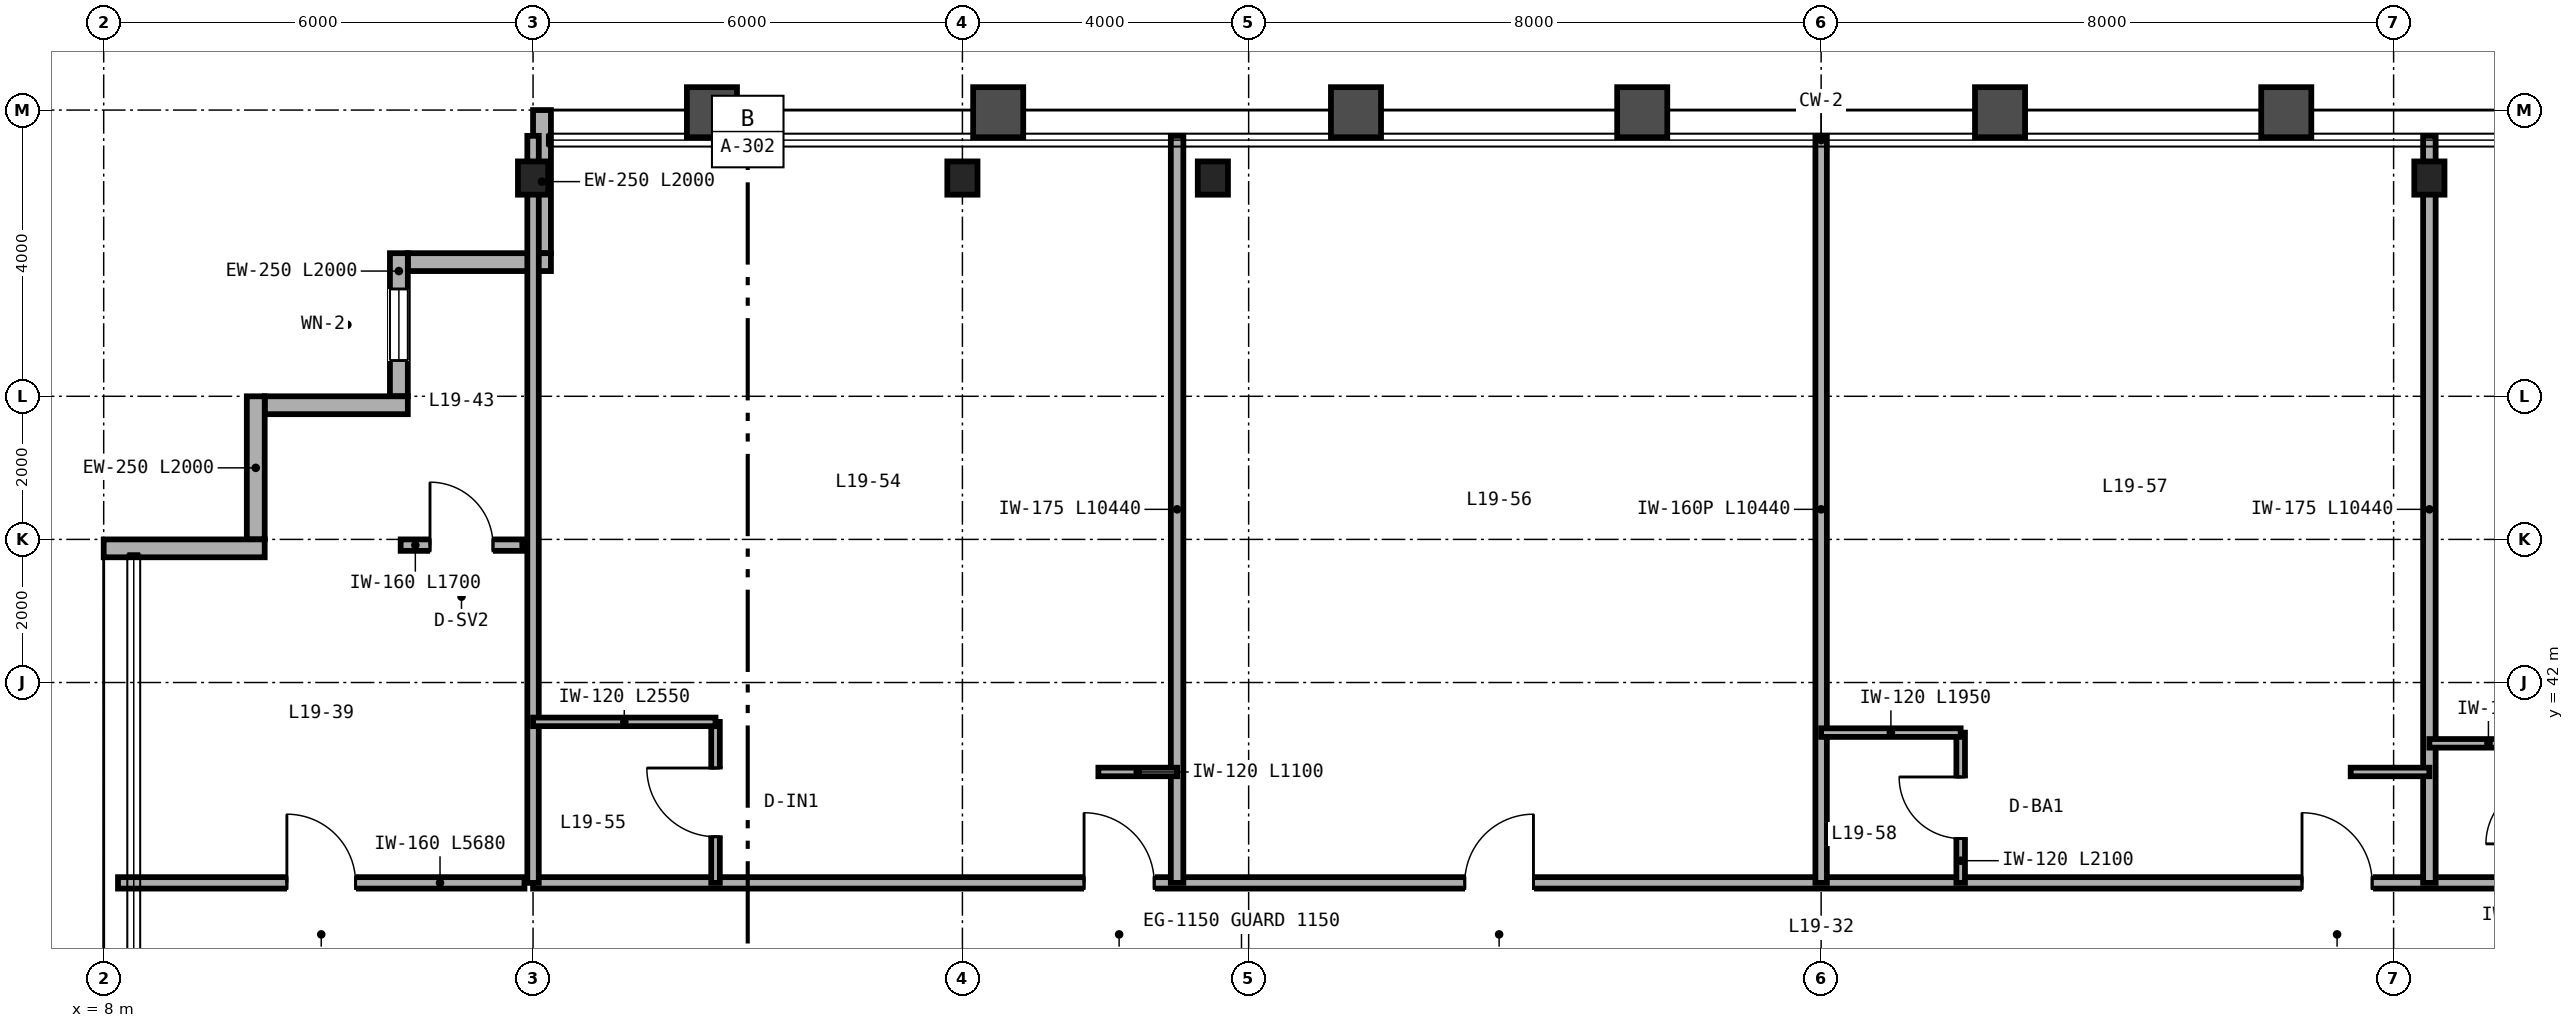
"""IFC4 building model, lengths in metres.
Left out: names, types, materials, properties, quantities, classifications, styles, units other than length and angle.
Written with IfcOpenShell. Run it as: python <this file> out.ifc"""

import sys

from ifc_helpers import new_model, si_unit, direction, frame, frame_2d, origin, origin_2d, place, context, subcontext, project, spatial, rectangle, i_section, extrude, source, transform, mapped, element, fill, save


model = new_model("IFC4")
c1 = context("Model", 3, precision=1e-05, world=origin(), true_north=direction((0.0, 1.0)))
c2 = subcontext(c1, "Body", "Model", "MODEL_VIEW")
j1 = project(units=[si_unit("LENGTHUNIT", "METRE"), si_unit("PLANEANGLEUNIT", "RADIAN")], contexts=[c1])
p1 = place(None, origin())
s1 = spatial("IfcSite", under=j1, at=p1, CompositionType="ELEMENT")
p2 = place(p1, origin())
s2 = spatial("IfcBuilding", under=s1, at=p2, CompositionType="ELEMENT")
p3 = place(p2, frame((0.0, 0.0, 78.0)))
s3 = spatial("IfcBuildingStorey", under=s2, at=p3, CompositionType="ELEMENT", Elevation=78.0)
m1 = source(origin(), c2, "Body", "SweptSolid", [
    extrude(i_section(OverallWidth=0.422, OverallDepth=0.465, WebThickness=0.045, FlangeThickness=0.073, FilletRadius=0.025, at=origin_2d()), origin(), (0.0, 0.0, 1.0), 3.35),
])
for number, where, z_axis, x_axis in (
    (1, (14.0, 49.05, 0.0), (0.0, 0.0, 1.0), (1.0, 0.0, 0.0)),
    (2, (20.0, 49.05, 0.0), (0.0, 0.0, 1.0), (1.0, 0.0, 0.0)),
    (3, (23.5, 49.05, 0.0), (0.0, 0.0, 1.0), (1.0, 0.0, 0.0)),
    (4, (40.5, 49.05, 0.0), (0.0, 0.0, 1.0), (1.0, 0.0, 0.0)),
):
    element("IfcColumn", number, at=place(p3, frame(where, z_axis=z_axis, x_axis=x_axis)), inside=s3, PredefinedType="COLUMN", context=c2, shape_type="MappedRepresentation", body=[
        mapped(m1, transform((0.0, 0.0, 0.0), scale=1.0)),
    ])
p4 = place(p3, frame((14.125, 50.0, 0.0), z_axis=(0.0, 0.0, 1.0), x_axis=(0.0, -1.0, 0.0)))
e5 = element("IfcWall", 5, at=p4, inside=s3, PredefinedType="SOLIDWALL", context=c2, shape_type="SweptSolid", body=[
    extrude(rectangle(XDim=2.0, YDim=0.25, at=frame_2d((1.0, 0.0))), origin(), (0.0, 0.0, 1.0), 2.657),
])
p5 = place(p3, frame((14.25, 47.875, 0.0), z_axis=(0.0, 0.0, 1.0), x_axis=(-1.0, 0.0, 0.0)))
e6 = element("IfcWall", 6, at=p5, inside=s3, PredefinedType="SOLIDWALL", context=c2, shape_type="SweptSolid", body=[
    extrude(rectangle(XDim=2.0, YDim=0.25, at=frame_2d((1.0, 0.0))), origin(), (0.0, 0.0, 1.0), 3.35),
])
p6 = place(p3, frame((12.125, 48.0, 0.0), z_axis=(0.0, 0.0, 1.0), x_axis=(0.0, -1.0, 0.0)))
e7 = element("IfcWall", 7, at=p6, inside=s3, PredefinedType="SOLIDWALL", context=c2, shape_type="SweptSolid", body=[
    extrude(rectangle(XDim=2.0, YDim=0.25, at=frame_2d((1.0, 0.0))), origin(), (0.0, 0.0, 1.0), 3.35),
])
p7 = place(p6, frame((0.5, 0.0, 0.85)))
e8 = element("IfcOpeningElement", 8, at=p7, cuts=e7, PredefinedType="OPENING", context=c2, shape_type="SweptSolid", body=[
    extrude(rectangle(XDim=1.0, YDim=1.9, at=frame_2d((0.5, 0.95))), frame((0.0, 0.135, 0.0), z_axis=(0.0, -1.0, 0.0), x_axis=(1.0, 0.0, 0.0)), (0.0, 0.0, 1.0), 0.27),
])
for number, where, z_axis, x_axis in (
    (9, (12.25, 45.875, 0.0), (0.0, 0.0, 1.0), (-1.0, 0.0, 0.0)),
    (10, (10.125, 46.0, 0.0), (0.0, 0.0, 1.0), (0.0, -1.0, 0.0)),
):
    element("IfcWall", number, at=place(p3, frame(where, z_axis=z_axis, x_axis=x_axis)), inside=s3, PredefinedType="SOLIDWALL", context=c2, shape_type="SweptSolid", body=[
        extrude(rectangle(XDim=2.0, YDim=0.25, at=frame_2d((1.0, 0.0))), origin(), (0.0, 0.0, 1.0), 3.35),
    ])
p8 = place(p3, frame((10.25, 43.875, 0.0), z_axis=(0.0, 0.0, 1.0), x_axis=(-1.0, 0.0, 0.0)))
e11 = element("IfcWall", 11, at=p8, inside=s3, PredefinedType="SOLIDWALL", context=c2, shape_type="SweptSolid", body=[
    extrude(rectangle(XDim=2.25, YDim=0.25, at=frame_2d((1.125, 0.0))), origin(), (0.0, 0.0, 1.0), 3.35),
])
p9 = place(p3, frame((8.2, 39.2, 0.0), z_axis=(0.0, 0.0, 1.0), x_axis=(1.0, 0.0, 0.0)))
e12 = element("IfcWall", 12, at=p9, inside=s3, PredefinedType="PARTITIONING", context=c2, shape_type="SweptSolid", body=[
    extrude(rectangle(XDim=5.68, YDim=0.16, at=frame_2d((2.84, 0.0))), origin(), (0.0, 0.0, 1.0), 3.35),
])
p10 = place(p9, frame((2.36, 0.0, 0.0)))
e13 = element("IfcOpeningElement", 13, at=p10, cuts=e12, PredefinedType="OPENING", context=c2, shape_type="SweptSolid", body=[
    extrude(rectangle(XDim=0.96, YDim=2.15, at=frame_2d((0.48, 1.075))), frame((0.0, 0.09, 0.0), z_axis=(0.0, -1.0, 0.0), x_axis=(1.0, 0.0, 0.0)), (0.0, 0.0, 1.0), 0.18),
])
p11 = place(p3, frame((12.15, 43.92, 0.0), z_axis=(0.0, 0.0, 1.0), x_axis=(1.0, 0.0, 0.0)))
e14 = element("IfcWall", 14, at=p11, inside=s3, PredefinedType="PARTITIONING", context=c2, shape_type="SweptSolid", body=[
    extrude(rectangle(XDim=1.7, YDim=0.16, at=frame_2d((0.85, 0.0))), origin(), (0.0, 0.0, 1.0), 3.35),
])
p12 = place(p11, frame((0.41, 0.0, 0.0)))
e15 = element("IfcOpeningElement", 15, at=p12, cuts=e14, PredefinedType="OPENING", context=c2, shape_type="SweptSolid", body=[
    extrude(rectangle(XDim=0.88, YDim=2.15, at=frame_2d((0.44, 1.075))), frame((0.0, 0.09, 0.0), z_axis=(0.0, -1.0, 0.0), x_axis=(1.0, 0.0, 0.0)), (0.0, 0.0, 1.0), 0.18),
])
p13 = place(p3, frame((14.0, 39.2, 0.0), z_axis=(0.0, 0.0, 1.0), x_axis=(1.0, 0.0, 0.0)))
e16 = element("IfcWall", 16, at=p13, inside=s3, PredefinedType="PARTITIONING", context=c2, shape_type="SweptSolid", body=[
    extrude(rectangle(XDim=36.0, YDim=0.16, at=frame_2d((18.0, 0.0))), origin(), (0.0, 0.0, 1.0), 2.571),
])
p14 = place(p13, frame((7.7, 0.0, 0.0)))
e17 = element("IfcOpeningElement", 17, at=p14, cuts=e16, PredefinedType="OPENING", context=c2, shape_type="SweptSolid", body=[
    extrude(rectangle(XDim=0.98, YDim=2.2, at=frame_2d((0.49, 1.1))), frame((0.0, 0.09, 0.0), z_axis=(0.0, -1.0, 0.0), x_axis=(1.0, 0.0, 0.0)), (0.0, 0.0, 1.0), 0.18),
])
p15 = place(p13, frame((13.02, 0.0, 0.0)))
e18 = element("IfcOpeningElement", 18, at=p15, cuts=e16, PredefinedType="OPENING", context=c2, shape_type="SweptSolid", body=[
    extrude(rectangle(XDim=0.96, YDim=2.15, at=frame_2d((0.48, 1.075))), frame((0.0, 0.09, 0.0), z_axis=(0.0, -1.0, 0.0), x_axis=(1.0, 0.0, 0.0)), (0.0, 0.0, 1.0), 0.18),
])
p16 = place(p13, frame((24.72, 0.0, 0.0)))
e19 = element("IfcOpeningElement", 19, at=p16, cuts=e16, PredefinedType="OPENING", context=c2, shape_type="SweptSolid", body=[
    extrude(rectangle(XDim=0.98, YDim=2.2, at=frame_2d((0.49, 1.1))), frame((0.0, 0.09, 0.0), z_axis=(0.0, -1.0, 0.0), x_axis=(1.0, 0.0, 0.0)), (0.0, 0.0, 1.0), 0.18),
])
p17 = place(p13, frame((30.14, 0.0, 0.0)))
e20 = element("IfcOpeningElement", 20, at=p17, cuts=e16, PredefinedType="OPENING", context=c2, shape_type="SweptSolid", body=[
    extrude(rectangle(XDim=0.94, YDim=2.15, at=frame_2d((0.47, 1.075))), frame((0.0, 0.09, 0.0), z_axis=(0.0, -1.0, 0.0), x_axis=(1.0, 0.0, 0.0)), (0.0, 0.0, 1.0), 0.18),
])
p18 = place(p13, frame((34.74, 0.0, 0.0)))
e21 = element("IfcOpeningElement", 21, at=p18, cuts=e16, PredefinedType="OPENING", context=c2, shape_type="SweptSolid", body=[
    extrude(rectangle(XDim=0.94, YDim=2.15, at=frame_2d((0.47, 1.075))), frame((0.0, 0.09, 0.0), z_axis=(0.0, -1.0, 0.0), x_axis=(1.0, 0.0, 0.0)), (0.0, 0.0, 1.0), 0.18),
])
p19 = place(p3, frame((14.0, 39.2, 0.0), z_axis=(0.0, 0.0, 1.0), x_axis=(0.0, 1.0, 0.0)))
e22 = element("IfcWall", 22, at=p19, inside=s3, PredefinedType="PARTITIONING", context=c2, shape_type="SweptSolid", body=[
    extrude(rectangle(XDim=10.44, YDim=0.16, at=frame_2d((5.22, 0.0))), origin(), (0.0, 0.0, 1.0), 2.657),
])
p20 = place(p3, frame((23.0, 39.2, 0.0), z_axis=(0.0, 0.0, 1.0), x_axis=(0.0, 1.0, 0.0)))
e23 = element("IfcWall", 23, at=p20, inside=s3, PredefinedType="PARTITIONING", context=c2, shape_type="SweptSolid", body=[
    extrude(rectangle(XDim=10.44, YDim=0.175, at=frame_2d((5.22, 0.0))), origin(), (0.0, 0.0, 1.0), 2.813),
])
p21 = place(p3, frame((16.55, 39.2, 0.0), z_axis=(0.0, 0.0, 1.0), x_axis=(0.0, 1.0, 0.0)))
e24 = element("IfcWall", 24, at=p21, inside=s3, PredefinedType="PARTITIONING", context=c2, shape_type="SweptSolid", body=[
    extrude(rectangle(XDim=2.25, YDim=0.12, at=frame_2d((1.125, 0.0))), origin(), (0.0, 0.0, 1.0), 3.35),
])
p22 = place(p21, frame((0.645, 0.0, 0.0)))
e25 = element("IfcOpeningElement", 25, at=p22, cuts=e24, PredefinedType="OPENING", context=c2, shape_type="SweptSolid", body=[
    extrude(rectangle(XDim=0.96, YDim=2.15, at=frame_2d((0.48, 1.075))), frame((0.0, 0.07, 0.0), z_axis=(0.0, -1.0, 0.0), x_axis=(1.0, 0.0, 0.0)), (0.0, 0.0, 1.0), 0.14),
])
p23 = place(p3, frame((14.0, 41.45, 0.0), z_axis=(0.0, 0.0, 1.0), x_axis=(1.0, 0.0, 0.0)))
e26 = element("IfcWall", 26, at=p23, inside=s3, PredefinedType="PARTITIONING", context=c2, shape_type="SweptSolid", body=[
    extrude(rectangle(XDim=2.55, YDim=0.12, at=frame_2d((1.275, 0.0))), origin(), (0.0, 0.0, 1.0), 3.35),
])
p24 = place(p3, frame((21.9, 40.75, 0.0), z_axis=(0.0, 0.0, 1.0), x_axis=(1.0, 0.0, 0.0)))
e27 = element("IfcWall", 27, at=p24, inside=s3, PredefinedType="PARTITIONING", context=c2, shape_type="SweptSolid", body=[
    extrude(rectangle(XDim=1.1, YDim=0.12, at=frame_2d((0.55, 0.0))), origin(), (0.0, 0.0, 1.0), 3.35),
])
p25 = place(p3, frame((32.0, 39.2, 0.0), z_axis=(0.0, 0.0, 1.0), x_axis=(0.0, 1.0, 0.0)))
e28 = element("IfcWall", 28, at=p25, inside=s3, PredefinedType="PARTITIONING", context=c2, shape_type="SweptSolid", body=[
    extrude(rectangle(XDim=10.44, YDim=0.16, at=frame_2d((5.22, 0.0))), origin(), (0.0, 0.0, 1.0), 2.423),
])
p26 = place(p3, frame((40.5, 39.2, 0.0), z_axis=(0.0, 0.0, 1.0), x_axis=(0.0, 1.0, 0.0)))
e29 = element("IfcWall", 29, at=p26, inside=s3, PredefinedType="PARTITIONING", context=c2, shape_type="SweptSolid", body=[
    extrude(rectangle(XDim=10.44, YDim=0.175, at=frame_2d((5.22, 0.0))), origin(), (0.0, 0.0, 1.0), 2.423),
])
p27 = place(p3, frame((33.95, 39.2, 0.0), z_axis=(0.0, 0.0, 1.0), x_axis=(0.0, 1.0, 0.0)))
e30 = element("IfcWall", 30, at=p27, inside=s3, PredefinedType="PARTITIONING", context=c2, shape_type="SweptSolid", body=[
    extrude(rectangle(XDim=2.1, YDim=0.12, at=frame_2d((1.05, 0.0))), origin(), (0.0, 0.0, 1.0), 3.35),
])
p28 = place(p27, frame((0.62, 0.0, 0.0)))
e31 = element("IfcOpeningElement", 31, at=p28, cuts=e30, PredefinedType="OPENING", context=c2, shape_type="SweptSolid", body=[
    extrude(rectangle(XDim=0.86, YDim=2.1, at=frame_2d((0.43, 1.05))), frame((0.0, 0.07, 0.0), z_axis=(0.0, -1.0, 0.0), x_axis=(1.0, 0.0, 0.0)), (0.0, 0.0, 1.0), 0.14),
])
p29 = place(p3, frame((32.0, 41.3, 0.0), z_axis=(0.0, 0.0, 1.0), x_axis=(1.0, 0.0, 0.0)))
e32 = element("IfcWall", 32, at=p29, inside=s3, PredefinedType="PARTITIONING", context=c2, shape_type="SweptSolid", body=[
    extrude(rectangle(XDim=1.95, YDim=0.12, at=frame_2d((0.975, 0.0))), origin(), (0.0, 0.0, 1.0), 3.35),
])
p30 = place(p3, frame((39.4, 40.75, 0.0), z_axis=(0.0, 0.0, 1.0), x_axis=(1.0, 0.0, 0.0)))
e33 = element("IfcWall", 33, at=p30, inside=s3, PredefinedType="PARTITIONING", context=c2, shape_type="SweptSolid", body=[
    extrude(rectangle(XDim=1.1, YDim=0.12, at=frame_2d((0.55, 0.0))), origin(), (0.0, 0.0, 1.0), 2.571),
])
p31 = place(p3, frame((40.5, 41.15, 0.0), z_axis=(0.0, 0.0, 1.0), x_axis=(1.0, 0.0, 0.0)))
e34 = element("IfcWall", 34, at=p31, inside=s3, PredefinedType="PARTITIONING", context=c2, shape_type="SweptSolid", body=[
    extrude(rectangle(XDim=1.65, YDim=0.12, at=frame_2d((0.825, 0.0))), origin(), (0.0, 0.0, 1.0), 2.571),
])
m2 = source(origin(), c2, "Body", "SweptSolid", [
    extrude(rectangle(XDim=1.0, YDim=1.9, at=frame_2d((0.5, 0.95))), frame((0.0, 0.03, 0.0), z_axis=(0.0, -1.0, 0.0), x_axis=(1.0, 0.0, 0.0)), (0.0, 0.0, 1.0), 0.06),
])
p32 = place(p7, origin())
e35 = element("IfcWindow", 35, at=p32, inside=s3, PartitioningType="SINGLE_PANEL", PredefinedType="WINDOW", context=c2, shape_type="MappedRepresentation", body=[
    mapped(m2, transform((0.0, 0.0, 0.0), scale=1.0)),
])
fill(e8, e35)
m3 = source(origin(), c2, "Body", "SweptSolid", [
    extrude(rectangle(XDim=0.96, YDim=2.15, at=frame_2d((0.48, 1.075))), frame((0.0, 0.025, 0.0), z_axis=(0.0, -1.0, 0.0), x_axis=(1.0, 0.0, 0.0)), (0.0, 0.0, 1.0), 0.05),
])
p33 = place(p10, origin())
e36 = element("IfcDoor", 36, at=p33, inside=s3, OperationType="SINGLE_SWING_LEFT", PredefinedType="DOOR", context=c2, shape_type="MappedRepresentation", body=[
    mapped(m3, transform((0.0, 0.0, 0.0), scale=1.0)),
])
fill(e13, e36)
m4 = source(origin(), c2, "Body", "SweptSolid", [
    extrude(rectangle(XDim=0.88, YDim=2.15, at=frame_2d((0.44, 1.075))), frame((0.0, 0.025, 0.0), z_axis=(0.0, -1.0, 0.0), x_axis=(1.0, 0.0, 0.0)), (0.0, 0.0, 1.0), 0.05),
])
p34 = place(p12, origin())
e37 = element("IfcDoor", 37, at=p34, inside=s3, OperationType="SINGLE_SWING_LEFT", PredefinedType="DOOR", context=c2, shape_type="MappedRepresentation", body=[
    mapped(m4, transform((0.0, 0.0, 0.0), scale=1.0)),
])
fill(e15, e37)
p35 = place(p22, origin())
e38 = element("IfcDoor", 38, at=p35, inside=s3, OperationType="SINGLE_SWING_RIGHT", PredefinedType="DOOR", context=c2, shape_type="MappedRepresentation", body=[
    mapped(m3, transform((0.0, 0.0, 0.0), scale=1.0)),
])
fill(e25, e38)
m5 = source(origin(), c2, "Body", "SweptSolid", [
    extrude(rectangle(XDim=0.86, YDim=2.1, at=frame_2d((0.43, 1.05))), frame((0.0, 0.025, 0.0), z_axis=(0.0, -1.0, 0.0), x_axis=(1.0, 0.0, 0.0)), (0.0, 0.0, 1.0), 0.05),
])
p36 = place(p28, origin())
e39 = element("IfcDoor", 39, at=p36, inside=s3, OperationType="SINGLE_SWING_RIGHT", PredefinedType="DOOR", context=c2, shape_type="MappedRepresentation", body=[
    mapped(m5, transform((0.0, 0.0, 0.0), scale=1.0)),
])
fill(e31, e39)
m6 = source(origin(), c2, "Body", "SweptSolid", [
    extrude(rectangle(XDim=0.98, YDim=2.2, at=frame_2d((0.49, 1.1))), frame((0.0, 0.025, 0.0), z_axis=(0.0, -1.0, 0.0), x_axis=(1.0, 0.0, 0.0)), (0.0, 0.0, 1.0), 0.05),
])
p37 = place(p14, origin())
e40 = element("IfcDoor", 40, at=p37, inside=s3, OperationType="SINGLE_SWING_LEFT", PredefinedType="DOOR", context=c2, shape_type="MappedRepresentation", body=[
    mapped(m6, transform((0.0, 0.0, 0.0), scale=1.0)),
])
fill(e17, e40)
p38 = place(p15, origin())
e41 = element("IfcDoor", 41, at=p38, inside=s3, OperationType="SINGLE_SWING_RIGHT", PredefinedType="DOOR", context=c2, shape_type="MappedRepresentation", body=[
    mapped(m3, transform((0.0, 0.0, 0.0), scale=1.0)),
])
fill(e18, e41)
p39 = place(p16, origin())
e42 = element("IfcDoor", 42, at=p39, inside=s3, OperationType="SINGLE_SWING_LEFT", PredefinedType="DOOR", context=c2, shape_type="MappedRepresentation", body=[
    mapped(m6, transform((0.0, 0.0, 0.0), scale=1.0)),
])
fill(e19, e42)
save(model, sys.argv[1])
